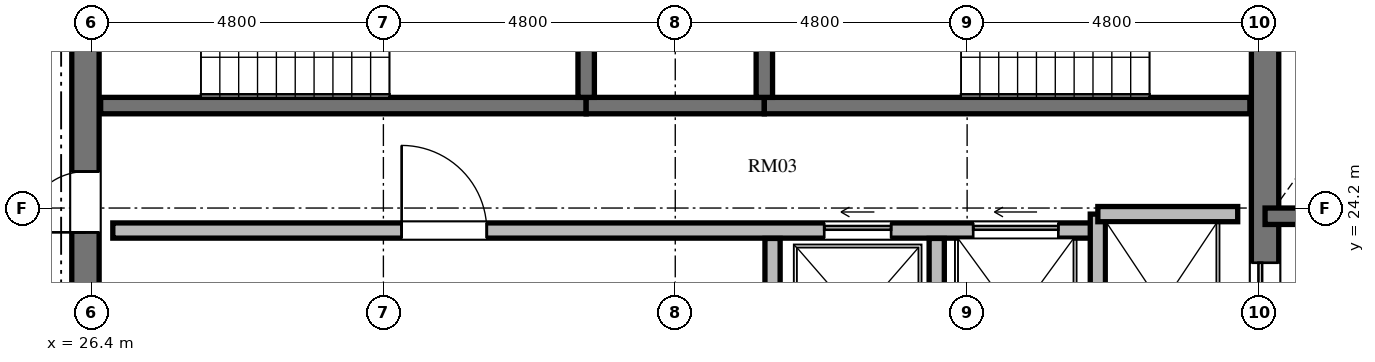
"""IFC4 building model, lengths in metres.
Left out: names, types, materials, properties, quantities, classifications, styles, units other than length and angle.
Written with IfcOpenShell. Run it as: python <this file> out.ifc"""

import sys

from ifc_helpers import new_model, si_unit, direction, frame, frame_2d, origin, place, context, subcontext, project, spatial, rectangle, extrude, element, fill, save


model = new_model("IFC4")
c1 = context("Model", 3, precision=1e-05, world=origin(), true_north=direction((0.0, 1.0)))
c2 = subcontext(c1, "Body", "Model", "MODEL_VIEW")
j1 = project(units=[si_unit("LENGTHUNIT", "METRE"), si_unit("PLANEANGLEUNIT", "RADIAN")], contexts=[c1])
p1 = place(None, origin())
s1 = spatial("IfcSite", under=j1, at=p1, CompositionType="ELEMENT")
p2 = place(p1, origin())
s2 = spatial("IfcBuilding", under=s1, at=p2, CompositionType="ELEMENT")
p3 = place(p2, frame((0.0, 0.0, 265.968)))
s3 = spatial("IfcBuildingStorey", under=s2, at=p3, CompositionType="ELEMENT", Elevation=265.968)
p4 = place(p3, frame((26.3, 20.95, 0.0), z_axis=(0.0, 0.0, 1.0), x_axis=(0.0, 1.0, 0.0)))
e1 = element("IfcWall", 1, at=p4, inside=s3, PredefinedType="SHEAR", context=c2, shape_type="SweptSolid", body=[
    extrude(rectangle(XDim=14.1, YDim=0.45, at=frame_2d((7.05, 0.0))), origin(), (0.0, 0.0, 1.0), 3.648),
])
p5 = place(p4, frame((6.5, 0.0, 0.0)))
e2 = element("IfcOpeningElement", 2, at=p5, cuts=e1, PredefinedType="OPENING", context=c2, shape_type="SweptSolid", body=[
    extrude(rectangle(XDim=1.2, YDim=2.15, at=frame_2d((0.6, 1.075))), frame((0.0, 0.235, 0.0), z_axis=(0.0, -1.0, 0.0), x_axis=(1.0, 0.0, 0.0)), (0.0, 0.0, 1.0), 0.47),
])
p6 = place(p4, frame((9.6, 0.0, 0.0)))
e3 = element("IfcOpeningElement", 3, at=p6, cuts=e1, PredefinedType="OPENING", context=c2, shape_type="SweptSolid", body=[
    extrude(rectangle(XDim=1.3, YDim=2.2, at=frame_2d((0.65, 1.1))), frame((0.0, 0.235, 0.0), z_axis=(0.0, -1.0, 0.0), x_axis=(1.0, 0.0, 0.0)), (0.0, 0.0, 1.0), 0.47),
])
p7 = place(p4, frame((2.85, 0.0, 0.0)))
e4 = element("IfcOpeningElement", 4, at=p7, cuts=e1, PredefinedType="OPENING", context=c2, shape_type="SweptSolid", body=[
    extrude(rectangle(XDim=1.0, YDim=2.04, at=frame_2d((0.5, 1.02))), frame((0.0, 0.235, 0.0), z_axis=(0.0, -1.0, 0.0), x_axis=(1.0, 0.0, 0.0)), (0.0, 0.0, 1.0), 0.47),
])
p8 = place(p3, frame((45.7, 20.95, 0.0), z_axis=(0.0, 0.0, 1.0), x_axis=(0.0, 1.0, 0.0)))
e5 = element("IfcWall", 5, at=p8, inside=s3, PredefinedType="SHEAR", context=c2, shape_type="SweptSolid", body=[
    extrude(rectangle(XDim=14.1, YDim=0.45, at=frame_2d((7.05, 0.0))), origin(), (0.0, 0.0, 1.0), 3.648),
])
p9 = place(p8, frame((11.75, 0.0, 0.0)))
e6 = element("IfcOpeningElement", 6, at=p9, cuts=e5, PredefinedType="OPENING", context=c2, shape_type="SweptSolid", body=[
    extrude(rectangle(XDim=1.4, YDim=2.3, at=frame_2d((0.7, 1.15))), frame((0.0, 0.235, 0.0), z_axis=(0.0, -1.0, 0.0), x_axis=(1.0, 0.0, 0.0)), (0.0, 0.0, 1.0), 0.47),
])
p10 = place(p8, frame((0.95, 0.0, 0.0)))
e7 = element("IfcOpeningElement", 7, at=p10, cuts=e5, PredefinedType="OPENING", context=c2, shape_type="SweptSolid", body=[
    extrude(rectangle(XDim=1.4, YDim=2.3, at=frame_2d((0.7, 1.15))), frame((0.0, 0.235, 0.0), z_axis=(0.0, -1.0, 0.0), x_axis=(1.0, 0.0, 0.0)), (0.0, 0.0, 1.0), 0.47),
])
p11 = place(p3, frame((26.55, 25.885, 0.0), z_axis=(0.0, 0.0, 1.0), x_axis=(1.0, 0.0, 0.0)))
e8 = element("IfcWall", 8, at=p11, inside=s3, PredefinedType="SHEAR", context=c2, shape_type="SweptSolid", body=[
    extrude(rectangle(XDim=7.985, YDim=0.27, at=frame_2d((3.992, 0.0))), origin(), (0.0, 0.0, 1.0), 3.648),
])
p12 = place(p3, frame((34.535, 25.885, 0.0), z_axis=(0.0, 0.0, 1.0), x_axis=(1.0, 0.0, 0.0)))
e9 = element("IfcWall", 9, at=p12, inside=s3, PredefinedType="SHEAR", context=c2, shape_type="SweptSolid", body=[
    extrude(rectangle(XDim=2.93, YDim=0.27, at=frame_2d((1.465, 0.0))), origin(), (0.0, 0.0, 1.0), 3.648),
])
p13 = place(p3, frame((37.465, 25.885, 0.0), z_axis=(0.0, 0.0, 1.0), x_axis=(1.0, 0.0, 0.0)))
e10 = element("IfcWall", 10, at=p13, inside=s3, PredefinedType="SHEAR", context=c2, shape_type="SweptSolid", body=[
    extrude(rectangle(XDim=7.985, YDim=0.27, at=frame_2d((3.992, 0.0))), origin(), (0.0, 0.0, 1.0), 3.648),
])
for number, where, z_axis, x_axis in (
    (11, (34.535, 26.02, 0.0), (0.0, 0.0, 1.0), (0.0, 1.0, 0.0)),
    (12, (37.465, 26.02, 0.0), (0.0, 0.0, 1.0), (0.0, 1.0, 0.0)),
):
    element("IfcWall", number, at=place(p3, frame(where, z_axis=z_axis, x_axis=x_axis)), inside=s3, PredefinedType="SHEAR", context=c2, shape_type="SweptSolid", body=[
        extrude(rectangle(XDim=4.08, YDim=0.27, at=frame_2d((2.04, 0.0))), origin(), (0.0, 0.0, 1.0), 3.648),
    ])
p14 = place(p3, frame((26.75, 23.83, 0.0), z_axis=(0.0, 0.0, 1.0), x_axis=(1.0, 0.0, 0.0)))
e13 = element("IfcWall", 13, at=p14, inside=s3, PredefinedType="SOLIDWALL", context=c2, shape_type="SweptSolid", body=[
    extrude(rectangle(XDim=16.2, YDim=0.25, at=frame_2d((8.1, 0.0))), origin(), (0.0, 0.0, 1.0), 3.198),
])
p15 = place(p14, frame((4.75, 0.0, 0.0)))
e14 = element("IfcOpeningElement", 14, at=p15, cuts=e13, PredefinedType="OPENING", context=c2, shape_type="SweptSolid", body=[
    extrude(rectangle(XDim=1.4, YDim=2.2, at=frame_2d((0.7, 1.1))), frame((0.0, 0.135, 0.0), z_axis=(0.0, -1.0, 0.0), x_axis=(1.0, 0.0, 0.0)), (0.0, 0.0, 1.0), 0.27),
])
p16 = place(p14, frame((11.7, 0.0, 0.0)))
e15 = element("IfcOpeningElement", 15, at=p16, cuts=e13, PredefinedType="OPENING", context=c2, shape_type="SweptSolid", body=[
    extrude(rectangle(XDim=1.1, YDim=2.2, at=frame_2d((0.55, 1.1))), frame((0.0, 0.135, 0.0), z_axis=(0.0, -1.0, 0.0), x_axis=(1.0, 0.0, 0.0)), (0.0, 0.0, 1.0), 0.27),
])
p17 = place(p14, frame((14.15, 0.0, 0.0)))
e16 = element("IfcOpeningElement", 16, at=p17, cuts=e13, PredefinedType="OPENING", context=c2, shape_type="SweptSolid", body=[
    extrude(rectangle(XDim=1.4, YDim=2.3, at=frame_2d((0.7, 1.15))), frame((0.0, 0.135, 0.0), z_axis=(0.0, -1.0, 0.0), x_axis=(1.0, 0.0, 0.0)), (0.0, 0.0, 1.0), 0.27),
])
p18 = place(p3, frame((42.95, 20.9, 0.0), z_axis=(0.0, 0.0, 1.0), x_axis=(0.0, 1.0, 0.0)))
e17 = element("IfcWall", 17, at=p18, inside=s3, PredefinedType="SOLIDWALL", context=c2, shape_type="SweptSolid", body=[
    extrude(rectangle(XDim=3.2, YDim=0.25, at=frame_2d((1.6, 0.0))), origin(), (0.0, 0.0, 1.0), 3.198),
])
p19 = place(p3, frame((42.95, 24.1, 0.0), z_axis=(0.0, 0.0, 1.0), x_axis=(1.0, 0.0, 0.0)))
e18 = element("IfcWall", 18, at=p19, inside=s3, PredefinedType="SOLIDWALL", context=c2, shape_type="SweptSolid", body=[
    extrude(rectangle(XDim=2.3, YDim=0.25, at=frame_2d((1.15, 0.0))), origin(), (0.0, 0.0, 1.0), 3.198),
])
for number, where, z_axis, x_axis in (
    (19, (37.6, 20.9, 0.0), (0.0, 0.0, 1.0), (0.0, 1.0, 0.0)),
    (20, (40.3, 20.9, 0.0), (0.0, 0.0, 1.0), (0.0, 1.0, 0.0)),
):
    element("IfcWall", number, at=place(p3, frame(where, z_axis=z_axis, x_axis=x_axis)), inside=s3, PredefinedType="SOLIDWALL", context=c2, shape_type="SweptSolid", body=[
        extrude(rectangle(XDim=2.8, YDim=0.25, at=frame_2d((1.4, 0.0))), origin(), (0.0, 0.0, 1.0), 3.198),
    ])
p20 = place(p3, frame((45.7, 24.065, 0.0), z_axis=(0.0, 0.0, 1.0), x_axis=(1.0, 0.0, 0.0)))
e21 = element("IfcWall", 21, at=p20, inside=s3, PredefinedType="SHEAR", context=c2, shape_type="SweptSolid", body=[
    extrude(rectangle(XDim=4.715, YDim=0.27, at=frame_2d((2.357, 0.0))), origin(), (0.0, 0.0, 1.0), 3.648),
])
p21 = place(p7, origin())
e22 = element("IfcDoor", 22, at=p21, inside=s3, OperationType="SINGLE_SWING_LEFT", PredefinedType="DOOR", context=c2, shape_type="SweptSolid", body=[
    extrude(rectangle(XDim=1.0, YDim=2.04, at=frame_2d((0.5, 1.02))), frame((0.0, 0.025, 0.0), z_axis=(0.0, -1.0, 0.0), x_axis=(1.0, 0.0, 0.0)), (0.0, 0.0, 1.0), 0.05),
])
fill(e4, e22)
p22 = place(p15, origin())
e23 = element("IfcDoor", 23, at=p22, inside=s3, OperationType="SINGLE_SWING_LEFT", PredefinedType="DOOR", context=c2, shape_type="SweptSolid", body=[
    extrude(rectangle(XDim=1.4, YDim=2.2, at=frame_2d((0.7, 1.1))), frame((0.0, 0.025, 0.0), z_axis=(0.0, -1.0, 0.0), x_axis=(1.0, 0.0, 0.0)), (0.0, 0.0, 1.0), 0.05),
])
fill(e14, e23)
p23 = place(p16, origin())
e24 = element("IfcDoor", 24, at=p23, inside=s3, OperationType="SLIDING_TO_LEFT", PredefinedType="DOOR", context=c2, shape_type="SweptSolid", body=[
    extrude(rectangle(XDim=1.1, YDim=2.2, at=frame_2d((0.55, 1.1))), frame((0.0, 0.025, 0.0), z_axis=(0.0, -1.0, 0.0), x_axis=(1.0, 0.0, 0.0)), (0.0, 0.0, 1.0), 0.05),
])
fill(e15, e24)
p24 = place(p10, origin())
e25 = element("IfcDoor", 25, at=p24, inside=s3, OperationType="SLIDING_TO_LEFT", PredefinedType="DOOR", context=c2, shape_type="SweptSolid", body=[
    extrude(rectangle(XDim=1.4, YDim=2.3, at=frame_2d((0.7, 1.15))), frame((0.0, 0.025, 0.0), z_axis=(0.0, -1.0, 0.0), x_axis=(1.0, 0.0, 0.0)), (0.0, 0.0, 1.0), 0.05),
])
fill(e7, e25)
p25 = place(p17, origin())
e26 = element("IfcDoor", 26, at=p25, inside=s3, OperationType="SLIDING_TO_LEFT", PredefinedType="DOOR", context=c2, shape_type="SweptSolid", body=[
    extrude(rectangle(XDim=1.4, YDim=2.3, at=frame_2d((0.7, 1.15))), frame((0.0, 0.025, 0.0), z_axis=(0.0, -1.0, 0.0), x_axis=(1.0, 0.0, 0.0)), (0.0, 0.0, 1.0), 0.05),
])
fill(e16, e26)
save(model, sys.argv[1])
